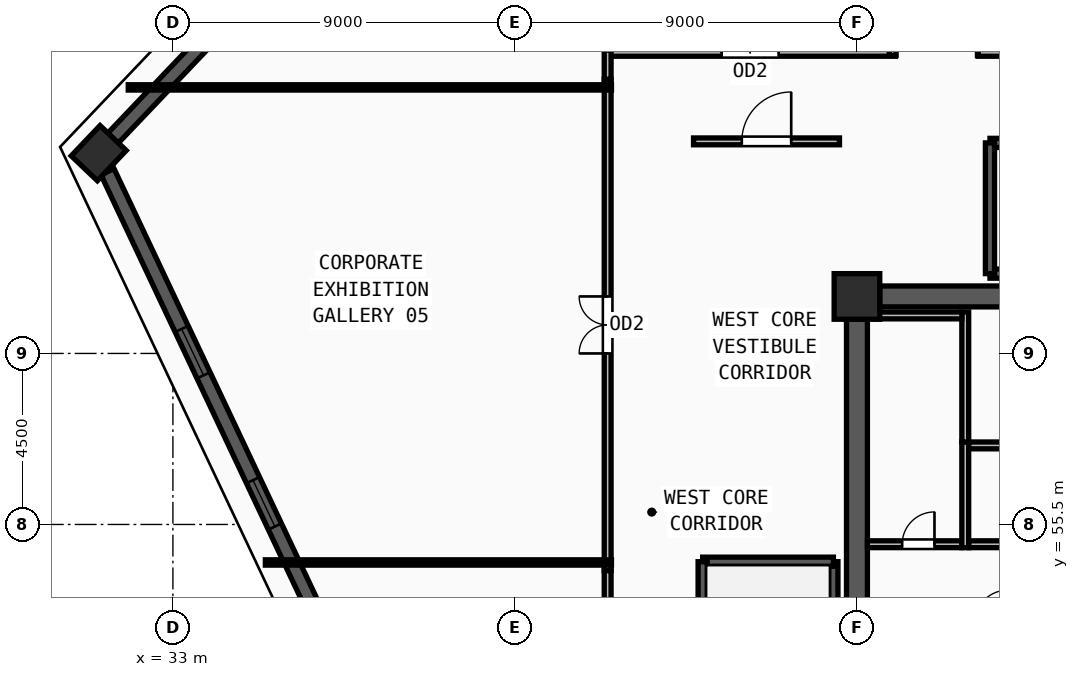
"""IFC4 building model, lengths in metres.
Left out: names, types, materials, properties, quantities, classifications, styles, units other than length and angle.
Written with IfcOpenShell. Run it as: python <this file> out.ifc"""

import sys

from ifc_helpers import new_model, si_unit, direction, frame, frame_2d, origin, origin_2d, place, context, subcontext, project, spatial, rectangle, extrude, source, transform, mapped, element, fill, save


model = new_model("IFC4")
c1 = context("Model", 3, precision=1e-05, world=origin(), true_north=direction((0.0, 1.0)))
c2 = subcontext(c1, "Body", "Model", "MODEL_VIEW")
j1 = project(units=[si_unit("LENGTHUNIT", "METRE"), si_unit("PLANEANGLEUNIT", "RADIAN")], contexts=[c1])
p1 = place(None, origin())
s1 = spatial("IfcSite", under=j1, at=p1, CompositionType="ELEMENT")
p2 = place(p1, origin())
s2 = spatial("IfcBuilding", under=s1, at=p2, CompositionType="ELEMENT")
p3 = place(p2, frame((0.0, 0.0, 339.75)))
s3 = spatial("IfcBuildingStorey", under=s2, at=p3, CompositionType="ELEMENT", Elevation=339.75)
m1 = source(origin(), c2, "Body", "SweptSolid", [
    extrude(rectangle(XDim=1.2, YDim=1.2, at=origin_2d()), origin(), (0.0, 0.0, 1.0), 3.75),
])
p4 = place(p3, frame((51.0, 61.5, 0.0), z_axis=(0.0, 0.0, 1.0), x_axis=(1.0, 0.0, 0.0)))
e1 = element("IfcColumn", 1, at=p4, inside=s3, PredefinedType="COLUMN", context=c2, shape_type="MappedRepresentation", body=[
    mapped(m1, transform((0.0, 0.0, 0.0), x_axis=(1.0, 0.0, 0.0), y_axis=(0.0, 1.0, 0.0), z_axis=(0.0, 0.0, 1.0), scale=1.0)),
])
m2 = source(origin(), c2, "Body", "SweptSolid", [
    extrude(rectangle(XDim=1.1, YDim=0.95, at=origin_2d()), origin(), (0.0, 0.0, 1.0), 3.75),
])
p5 = place(p3, frame((31.048, 65.27, 0.0), z_axis=(0.0, 0.0, 1.0), x_axis=(0.689493141399, 0.724292211723, 0.0)))
e2 = element("IfcColumn", 2, at=p5, inside=s3, PredefinedType="COLUMN", context=c2, shape_type="MappedRepresentation", body=[
    mapped(m2, transform((0.0, 0.0, 0.0), x_axis=(1.0, 0.0, 0.0), y_axis=(0.0, 1.0, 0.0), z_axis=(0.0, 0.0, 1.0), scale=1.0)),
])
p6 = place(p3, frame((34.021, 68.393, 0.0), z_axis=(0.0, 0.0, 1.0), x_axis=(-0.689516179324, -0.724270279972, 0.0)))
e3 = element("IfcWall", 3, at=p6, inside=s3, PredefinedType="SOLIDWALL", context=c2, shape_type="SweptSolid", body=[
    extrude(rectangle(XDim=3.772, YDim=0.38, at=frame_2d((1.886, 0.0))), origin(), (0.0, 0.0, 1.0), 3.57),
])
p7 = place(p3, frame((31.278, 64.782, 0.0), z_axis=(0.0, 0.0, 1.0), x_axis=(0.426732975356, -0.904377668756, 0.0)))
e4 = element("IfcWall", 4, at=p7, inside=s3, PredefinedType="SOLIDWALL", context=c2, shape_type="SweptSolid", body=[
    extrude(rectangle(XDim=20.999, YDim=0.38, at=frame_2d((10.5, 0.0))), origin(), (0.0, 0.0, 1.0), 3.57),
])
m3 = source(origin(), c2, "Body", "SweptSolid", [
    extrude(rectangle(XDim=1.35, YDim=1.85, at=frame_2d((0.675, 0.925))), frame((0.0, 0.2, 0.0), z_axis=(0.0, -1.0, 0.0), x_axis=(1.0, 0.0, 0.0)), (0.0, 0.0, 1.0), 0.4),
])
p8 = place(p7, frame((4.575, 0.0, 0.55)))
e5 = element("IfcOpeningElement", 5, at=p8, cuts=e4, PredefinedType="OPENING", context=c2, shape_type="MappedRepresentation", body=[
    mapped(m3, transform((0.0, 0.0, 0.0), x_axis=(1.0, 0.0, 0.0), y_axis=(0.0, 1.0, 0.0), z_axis=(0.0, 0.0, 1.0), scale=1.0)),
])
p9 = place(p7, frame((8.974, 0.0, 0.55)))
e6 = element("IfcOpeningElement", 6, at=p9, cuts=e4, PredefinedType="OPENING", context=c2, shape_type="MappedRepresentation", body=[
    mapped(m3, transform((0.0, 0.0, 0.0), x_axis=(1.0, 0.0, 0.0), y_axis=(0.0, 1.0, 0.0), z_axis=(0.0, 0.0, 1.0), scale=1.0)),
])
p10 = place(p7, frame((15.074, 0.0, 0.55)))
e7 = element("IfcOpeningElement", 7, at=p10, cuts=e4, PredefinedType="OPENING", context=c2, shape_type="MappedRepresentation", body=[
    mapped(m3, transform((0.0, 0.0, 0.0), x_axis=(1.0, 0.0, 0.0), y_axis=(0.0, 1.0, 0.0), z_axis=(0.0, 0.0, 1.0), scale=1.0)),
])
p11 = place(p3, frame((51.6, 61.5, 0.0), z_axis=(0.0, 0.0, 1.0), x_axis=(1.0, 0.0, 0.0)))
e8 = element("IfcWall", 8, at=p11, inside=s3, PredefinedType="SHEAR", context=c2, shape_type="SweptSolid", body=[
    extrude(rectangle(XDim=7.8, YDim=0.55, at=frame_2d((3.9, 0.0))), origin(), (0.0, 0.0, 1.0), 3.57),
])
p12 = place(p3, frame((51.0, 47.1, 0.0), z_axis=(0.0, 0.0, 1.0), x_axis=(0.0, 1.0, 0.0)))
e9 = element("IfcWall", 9, at=p12, inside=s3, PredefinedType="SHEAR", context=c2, shape_type="SweptSolid", body=[
    extrude(rectangle(XDim=13.8, YDim=0.55, at=frame_2d((6.9, 0.0))), origin(), (0.0, 0.0, 1.0), 3.57),
])
p13 = place(p3, frame((50.38, 46.7, 0.0), z_axis=(0.0, 0.0, 1.0), x_axis=(0.0, 1.0, 0.0)))
e10 = element("IfcWall", 10, at=p13, inside=s3, PredefinedType="SOLIDWALL", context=c2, shape_type="SweptSolid", body=[
    extrude(rectangle(XDim=7.82, YDim=0.24, at=frame_2d((3.91, 0.0))), origin(), (0.0, 0.0, 1.0), 3.57),
])
p14 = place(p3, frame((50.38, 54.52, 0.0), z_axis=(0.0, 0.0, 1.0), x_axis=(-1.0, 0.0, 0.0)))
e11 = element("IfcWall", 11, at=p14, inside=s3, PredefinedType="SOLIDWALL", context=c2, shape_type="SweptSolid", body=[
    extrude(rectangle(XDim=3.44, YDim=0.24, at=frame_2d((1.72, 0.0))), origin(), (0.0, 0.0, 1.0), 3.57),
])
p15 = place(p3, frame((46.94, 54.52, 0.0), z_axis=(0.0, 0.0, 1.0), x_axis=(0.0, -1.0, 0.0)))
e12 = element("IfcWall", 12, at=p15, inside=s3, PredefinedType="SOLIDWALL", context=c2, shape_type="SweptSolid", body=[
    extrude(rectangle(XDim=7.82, YDim=0.24, at=frame_2d((3.91, 0.0))), origin(), (0.0, 0.0, 1.0), 3.57),
])
m4 = source(origin(), c2, "Body", "SweptSolid", [
    extrude(rectangle(XDim=1.2, YDim=2.2, at=frame_2d((0.6, 1.1))), frame((0.0, 0.13, 0.0), z_axis=(0.0, -1.0, 0.0), x_axis=(1.0, 0.0, 0.0)), (0.0, 0.0, 1.0), 0.26),
])
p16 = place(p15, frame((6.3, 0.0, 0.0)))
e13 = element("IfcOpeningElement", 13, at=p16, cuts=e12, PredefinedType="OPENING", context=c2, shape_type="MappedRepresentation", body=[
    mapped(m4, transform((0.0, 0.0, 0.0), x_axis=(1.0, 0.0, 0.0), y_axis=(0.0, 1.0, 0.0), z_axis=(0.0, 0.0, 1.0), scale=1.0)),
])
p17 = place(p3, frame((54.5, 62.1, 0.0), z_axis=(0.0, 0.0, 1.0), x_axis=(1.0, 0.0, 0.0)))
e14 = element("IfcWall", 14, at=p17, inside=s3, PredefinedType="SOLIDWALL", context=c2, shape_type="SweptSolid", body=[
    extrude(rectangle(XDim=7.82, YDim=0.24, at=frame_2d((3.91, 0.0))), origin(), (0.0, 0.0, 1.0), 3.57),
])
p18 = place(p3, frame((62.32, 65.54, 0.0), z_axis=(0.0, 0.0, 1.0), x_axis=(-1.0, 0.0, 0.0)))
e15 = element("IfcWall", 15, at=p18, inside=s3, PredefinedType="SOLIDWALL", context=c2, shape_type="SweptSolid", body=[
    extrude(rectangle(XDim=7.82, YDim=0.24, at=frame_2d((3.91, 0.0))), origin(), (0.0, 0.0, 1.0), 3.57),
])
p19 = place(p18, frame((6.3, 0.0, 0.0)))
e16 = element("IfcOpeningElement", 16, at=p19, cuts=e15, PredefinedType="OPENING", context=c2, shape_type="MappedRepresentation", body=[
    mapped(m4, transform((0.0, 0.0, 0.0), x_axis=(1.0, 0.0, 0.0), y_axis=(0.0, 1.0, 0.0), z_axis=(0.0, 0.0, 1.0), scale=1.0)),
])
p20 = place(p3, frame((54.5, 65.54, 0.0), z_axis=(0.0, 0.0, 1.0), x_axis=(0.0, -1.0, 0.0)))
e17 = element("IfcWall", 17, at=p20, inside=s3, PredefinedType="SOLIDWALL", context=c2, shape_type="SweptSolid", body=[
    extrude(rectangle(XDim=3.44, YDim=0.24, at=frame_2d((1.72, 0.0))), origin(), (0.0, 0.0, 1.0), 3.57),
])
p21 = place(p3, frame((53.94, 54.98, 0.0), z_axis=(0.0, 0.0, 1.0), x_axis=(1.0, 0.0, 0.0)))
e18 = element("IfcWall", 18, at=p21, inside=s3, PredefinedType="PARTITIONING", context=c2, shape_type="SweptSolid", body=[
    extrude(rectangle(XDim=4.22, YDim=0.18, at=frame_2d((2.11, 0.0))), origin(), (0.0, 0.0, 1.0), 3.57),
])
m5 = source(origin(), c2, "Body", "SweptSolid", [
    extrude(rectangle(XDim=1.0, YDim=2.2, at=frame_2d((0.5, 1.1))), frame((0.0, 0.1, 0.0), z_axis=(0.0, -1.0, 0.0), x_axis=(1.0, 0.0, 0.0)), (0.0, 0.0, 1.0), 0.2),
])
p22 = place(p21, frame((1.61, 0.0, 0.0)))
e19 = element("IfcOpeningElement", 19, at=p22, cuts=e18, PredefinedType="OPENING", context=c2, shape_type="MappedRepresentation", body=[
    mapped(m5, transform((0.0, 0.0, 0.0), x_axis=(1.0, 0.0, 0.0), y_axis=(0.0, 1.0, 0.0), z_axis=(0.0, 0.0, 1.0), scale=1.0)),
])
p23 = place(p3, frame((51.275, 54.98, 0.0), z_axis=(0.0, 0.0, 1.0), x_axis=(1.0, 0.0, 0.0)))
e20 = element("IfcWall", 20, at=p23, inside=s3, PredefinedType="PARTITIONING", context=c2, shape_type="SweptSolid", body=[
    extrude(rectangle(XDim=2.485, YDim=0.18, at=frame_2d((1.243, 0.0))), origin(), (0.0, 0.0, 1.0), 3.57),
])
m6 = source(origin(), c2, "Body", "SweptSolid", [
    extrude(rectangle(XDim=0.85, YDim=2.1, at=frame_2d((0.425, 1.05))), frame((0.0, 0.1, 0.0), z_axis=(0.0, -1.0, 0.0), x_axis=(1.0, 0.0, 0.0)), (0.0, 0.0, 1.0), 0.2),
])
p24 = place(p23, frame((0.915, 0.0, 0.0)))
e21 = element("IfcOpeningElement", 21, at=p24, cuts=e20, PredefinedType="OPENING", context=c2, shape_type="MappedRepresentation", body=[
    mapped(m6, transform((0.0, 0.0, 0.0), x_axis=(1.0, 0.0, 0.0), y_axis=(0.0, 1.0, 0.0), z_axis=(0.0, 0.0, 1.0), scale=1.0)),
])
p25 = place(p3, frame((46.7, 65.58, 0.0), z_axis=(0.0, 0.0, 1.0), x_axis=(1.0, 0.0, 0.0)))
e22 = element("IfcWall", 22, at=p25, inside=s3, PredefinedType="PARTITIONING", context=c2, shape_type="SweptSolid", body=[
    extrude(rectangle(XDim=3.84, YDim=0.18, at=frame_2d((1.92, 0.0))), origin(), (0.0, 0.0, 1.0), 3.57),
])
m7 = source(origin(), c2, "Body", "SweptSolid", [
    extrude(rectangle(XDim=1.3, YDim=2.2, at=frame_2d((0.65, 1.1))), frame((0.0, 0.1, 0.0), z_axis=(0.0, -1.0, 0.0), x_axis=(1.0, 0.0, 0.0)), (0.0, 0.0, 1.0), 0.2),
])
p26 = place(p25, frame((1.27, 0.0, 0.0)))
e23 = element("IfcOpeningElement", 23, at=p26, cuts=e22, PredefinedType="OPENING", context=c2, shape_type="MappedRepresentation", body=[
    mapped(m7, transform((0.0, 0.0, 0.0), x_axis=(1.0, 0.0, 0.0), y_axis=(0.0, 1.0, 0.0), z_axis=(0.0, 0.0, 1.0), scale=1.0)),
])
p27 = place(p3, frame((54.26, 75.252, 0.0), z_axis=(0.0, 0.0, 1.0), x_axis=(0.0, -1.0, 0.0)))
e24 = element("IfcWall", 24, at=p27, inside=s3, PredefinedType="PARTITIONING", context=c2, shape_type="SweptSolid", body=[
    extrude(rectangle(XDim=7.412, YDim=0.18, at=frame_2d((3.706, 0.0))), origin(), (0.0, 0.0, 1.0), 3.57),
])
p28 = place(p27, frame((3.206, 0.0, 0.0)))
e25 = element("IfcOpeningElement", 25, at=p28, cuts=e24, PredefinedType="OPENING", context=c2, shape_type="MappedRepresentation", body=[
    mapped(m5, transform((0.0, 0.0, 0.0), x_axis=(1.0, 0.0, 0.0), y_axis=(0.0, 1.0, 0.0), z_axis=(0.0, 0.0, 1.0), scale=1.0)),
])
p29 = place(p3, frame((44.37, 67.91, 0.0), z_axis=(0.0, 0.0, 1.0), x_axis=(1.0, 0.0, 0.0)))
e26 = element("IfcWall", 26, at=p29, inside=s3, PredefinedType="PARTITIONING", context=c2, shape_type="SweptSolid", body=[
    extrude(rectangle(XDim=7.64, YDim=0.18, at=frame_2d((3.82, 0.0))), origin(), (0.0, 0.0, 1.0), 3.57),
])
m8 = source(origin(), c2, "Body", "SweptSolid", [
    extrude(rectangle(XDim=1.5, YDim=2.2, at=frame_2d((0.75, 1.1))), frame((0.0, 0.1, 0.0), z_axis=(0.0, -1.0, 0.0), x_axis=(1.0, 0.0, 0.0)), (0.0, 0.0, 1.0), 0.2),
])
p30 = place(p29, frame((3.07, 0.0, 0.0)))
e27 = element("IfcOpeningElement", 27, at=p30, cuts=e26, PredefinedType="OPENING", context=c2, shape_type="MappedRepresentation", body=[
    mapped(m8, transform((0.0, 0.0, 0.0), x_axis=(1.0, 0.0, 0.0), y_axis=(0.0, 1.0, 0.0), z_axis=(0.0, 0.0, 1.0), scale=1.0)),
])
p31 = place(p3, frame((44.44, 54.285, 0.0), z_axis=(0.0, 0.0, 1.0), x_axis=(0.0, 1.0, 0.0)))
e28 = element("IfcWall", 28, at=p31, inside=s3, PredefinedType="PARTITIONING", context=c2, shape_type="SweptSolid", body=[
    extrude(rectangle(XDim=12.93, YDim=0.18, at=frame_2d((6.465, 0.0))), origin(), (0.0, 0.0, 1.0), 3.261),
])
p32 = place(p31, frame((5.715, 0.0, 0.0)))
e29 = element("IfcOpeningElement", 29, at=p32, cuts=e28, PredefinedType="OPENING", context=c2, shape_type="MappedRepresentation", body=[
    mapped(m8, transform((0.0, 0.0, 0.0), x_axis=(1.0, 0.0, 0.0), y_axis=(0.0, 1.0, 0.0), z_axis=(0.0, 0.0, 1.0), scale=1.0)),
])
p33 = place(p3, frame((44.44, 44.815, 0.0), z_axis=(0.0, 0.0, 1.0), x_axis=(0.0, 1.0, 0.0)))
e30 = element("IfcWall", 30, at=p33, inside=s3, PredefinedType="PARTITIONING", context=c2, shape_type="SweptSolid", body=[
    extrude(rectangle(XDim=9.47, YDim=0.18, at=frame_2d((4.735, 0.0))), origin(), (0.0, 0.0, 1.0), 3.57),
])
p34 = place(p33, frame((4.47, 0.0, 0.0)))
e31 = element("IfcOpeningElement", 31, at=p34, cuts=e30, PredefinedType="OPENING", context=c2, shape_type="MappedRepresentation", body=[
    mapped(m5, transform((0.0, 0.0, 0.0), x_axis=(1.0, 0.0, 0.0), y_axis=(0.0, 1.0, 0.0), z_axis=(0.0, 0.0, 1.0), scale=1.0)),
])
p35 = place(p3, frame((54.19, 67.91, 0.0), z_axis=(0.0, 0.0, 1.0), x_axis=(1.0, 0.0, 0.0)))
e32 = element("IfcWall", 32, at=p35, inside=s3, PredefinedType="PARTITIONING", context=c2, shape_type="SweptSolid", body=[
    extrude(rectangle(XDim=4.095, YDim=0.18, at=frame_2d((2.047, 0.0))), origin(), (0.0, 0.0, 1.0), 3.57),
])
p36 = place(p3, frame((51.94, 67.84, 0.0), z_axis=(0.0, 0.0, 1.0), x_axis=(0.0, 1.0, 0.0)))
e33 = element("IfcWall", 33, at=p36, inside=s3, PredefinedType="PARTITIONING", context=c2, shape_type="SweptSolid", body=[
    extrude(rectangle(XDim=7.251, YDim=0.18, at=frame_2d((3.625, 0.0))), origin(), (0.0, 0.0, 1.0), 3.57),
])
p37 = place(p3, frame((44.44, 67.215, 0.0), z_axis=(0.0, 0.0, 1.0), x_axis=(0.0, 1.0, 0.0)))
e34 = element("IfcWall", 34, at=p37, inside=s3, PredefinedType="PARTITIONING", context=c2, shape_type="SweptSolid", body=[
    extrude(rectangle(XDim=0.765, YDim=0.18, at=frame_2d((0.382, 0.0))), origin(), (0.0, 0.0, 1.0), 3.57),
])
p38 = place(p3, frame((44.54, 54.5, 0.0), z_axis=(0.0, 0.0, 1.0), x_axis=(-1.0, 0.0, 0.0)))
e35 = element("IfcWall", 35, at=p38, inside=s3, PredefinedType="PARTITIONING", context=c2, shape_type="SweptSolid", body=[
    extrude(rectangle(XDim=9.107, YDim=0.14, at=frame_2d((4.553, 0.0))), origin(), (0.0, 0.0, 1.0), 3.57),
])
p39 = place(p3, frame((44.54, 67.0, 0.0), z_axis=(0.0, 0.0, 1.0), x_axis=(-1.0, 0.0, 0.0)))
e36 = element("IfcWall", 36, at=p39, inside=s3, PredefinedType="PARTITIONING", context=c2, shape_type="SweptSolid", body=[
    extrude(rectangle(XDim=12.715, YDim=0.14, at=frame_2d((6.357, 0.0))), origin(), (0.0, 0.0, 1.0), 3.57),
])
p40 = place(p3, frame((53.85, 54.89, 0.0), z_axis=(0.0, 0.0, 1.0), x_axis=(0.0, 1.0, 0.0)))
e37 = element("IfcWall", 37, at=p40, inside=s3, PredefinedType="PARTITIONING", context=c2, shape_type="SweptSolid", body=[
    extrude(rectangle(XDim=2.78, YDim=0.18, at=frame_2d((1.39, 0.0))), origin(), (0.0, 0.0, 1.0), 3.57),
])
p41 = place(p3, frame((53.94, 57.58, 0.0), z_axis=(0.0, 0.0, 1.0), x_axis=(1.0, 0.0, 0.0)))
e38 = element("IfcWall", 38, at=p41, inside=s3, PredefinedType="PARTITIONING", context=c2, shape_type="SweptSolid", body=[
    extrude(rectangle(XDim=4.22, YDim=0.18, at=frame_2d((2.11, 0.0))), origin(), (0.0, 0.0, 1.0), 3.57),
])
p42 = place(p3, frame((53.85, 57.67, 0.0), z_axis=(0.0, 0.0, 1.0), x_axis=(0.0, 1.0, 0.0)))
e39 = element("IfcWall", 39, at=p42, inside=s3, PredefinedType="PARTITIONING", context=c2, shape_type="SweptSolid", body=[
    extrude(rectangle(XDim=3.42, YDim=0.18, at=frame_2d((1.71, 0.0))), origin(), (0.0, 0.0, 1.0), 3.57),
])
p43 = place(p3, frame((51.437, 61.0, 0.0), z_axis=(0.0, 0.0, 1.0), x_axis=(1.0, 0.0, 0.0)))
e40 = element("IfcWall", 40, at=p43, inside=s3, PredefinedType="PARTITIONING", context=c2, shape_type="SweptSolid", body=[
    extrude(rectangle(XDim=2.323, YDim=0.18, at=frame_2d((1.162, 0.0))), origin(), (0.0, 0.0, 1.0), 3.57),
])
m9 = source(origin(), c2, "Body", "SweptSolid", [
    extrude(rectangle(XDim=1.35, YDim=1.85, at=frame_2d((0.675, 0.925))), frame((0.0, 0.03, 0.0), z_axis=(0.0, -1.0, 0.0), x_axis=(1.0, 0.0, 0.0)), (0.0, 0.0, 1.0), 0.06),
])
p44 = place(p8, origin())
e41 = element("IfcWindow", 41, at=p44, inside=s3, PartitioningType="SINGLE_PANEL", PredefinedType="WINDOW", context=c2, shape_type="MappedRepresentation", body=[
    mapped(m9, transform((0.0, 0.0, 0.0), x_axis=(1.0, 0.0, 0.0), y_axis=(0.0, 1.0, 0.0), z_axis=(0.0, 0.0, 1.0), scale=1.0)),
])
fill(e5, e41)
p45 = place(p9, origin())
e42 = element("IfcWindow", 42, at=p45, inside=s3, PartitioningType="SINGLE_PANEL", PredefinedType="WINDOW", context=c2, shape_type="MappedRepresentation", body=[
    mapped(m9, transform((0.0, 0.0, 0.0), x_axis=(1.0, 0.0, 0.0), y_axis=(0.0, 1.0, 0.0), z_axis=(0.0, 0.0, 1.0), scale=1.0)),
])
fill(e6, e42)
m10 = source(origin(), c2, "Body", "SweptSolid", [
    extrude(rectangle(XDim=0.85, YDim=2.1, at=frame_2d((0.425, 1.05))), frame((0.0, 0.025, 0.0), z_axis=(0.0, -1.0, 0.0), x_axis=(1.0, 0.0, 0.0)), (0.0, 0.0, 1.0), 0.05),
])
p46 = place(p24, origin())
e43 = element("IfcDoor", 43, at=p46, inside=s3, OperationType="SINGLE_SWING_RIGHT", PredefinedType="DOOR", context=c2, shape_type="MappedRepresentation", body=[
    mapped(m10, transform((0.0, 0.0, 0.0), x_axis=(1.0, 0.0, 0.0), y_axis=(0.0, 1.0, 0.0), z_axis=(0.0, 0.0, 1.0), scale=1.0)),
])
fill(e21, e43)
m11 = source(origin(), c2, "Body", "SweptSolid", [
    extrude(rectangle(XDim=1.3, YDim=2.2, at=frame_2d((0.65, 1.1))), frame((0.0, 0.025, 0.0), z_axis=(0.0, -1.0, 0.0), x_axis=(1.0, 0.0, 0.0)), (0.0, 0.0, 1.0), 0.05),
])
p47 = place(p26, origin())
e44 = element("IfcDoor", 44, at=p47, inside=s3, OperationType="SINGLE_SWING_RIGHT", PredefinedType="DOOR", context=c2, shape_type="MappedRepresentation", body=[
    mapped(m11, transform((0.0, 0.0, 0.0), x_axis=(1.0, 0.0, 0.0), y_axis=(0.0, 1.0, 0.0), z_axis=(0.0, 0.0, 1.0), scale=1.0)),
])
fill(e23, e44)
m12 = source(origin(), c2, "Body", "SweptSolid", [
    extrude(rectangle(XDim=1.5, YDim=2.2, at=frame_2d((0.75, 1.1))), frame((0.0, 0.025, 0.0), z_axis=(0.0, -1.0, 0.0), x_axis=(1.0, 0.0, 0.0)), (0.0, 0.0, 1.0), 0.05),
])
p48 = place(p30, origin())
e45 = element("IfcDoor", 45, at=p48, inside=s3, OperationType="DOUBLE_DOOR_SINGLE_SWING", PredefinedType="DOOR", context=c2, shape_type="MappedRepresentation", body=[
    mapped(m12, transform((0.0, 0.0, 0.0), x_axis=(1.0, 0.0, 0.0), y_axis=(0.0, 1.0, 0.0), z_axis=(0.0, 0.0, 1.0), scale=1.0)),
])
fill(e27, e45)
p49 = place(p32, origin())
e46 = element("IfcDoor", 46, at=p49, inside=s3, OperationType="DOUBLE_DOOR_SINGLE_SWING", PredefinedType="DOOR", context=c2, shape_type="MappedRepresentation", body=[
    mapped(m12, transform((0.0, 0.0, 0.0), x_axis=(1.0, 0.0, 0.0), y_axis=(0.0, 1.0, 0.0), z_axis=(0.0, 0.0, 1.0), scale=1.0)),
])
fill(e29, e46)
save(model, sys.argv[1])
